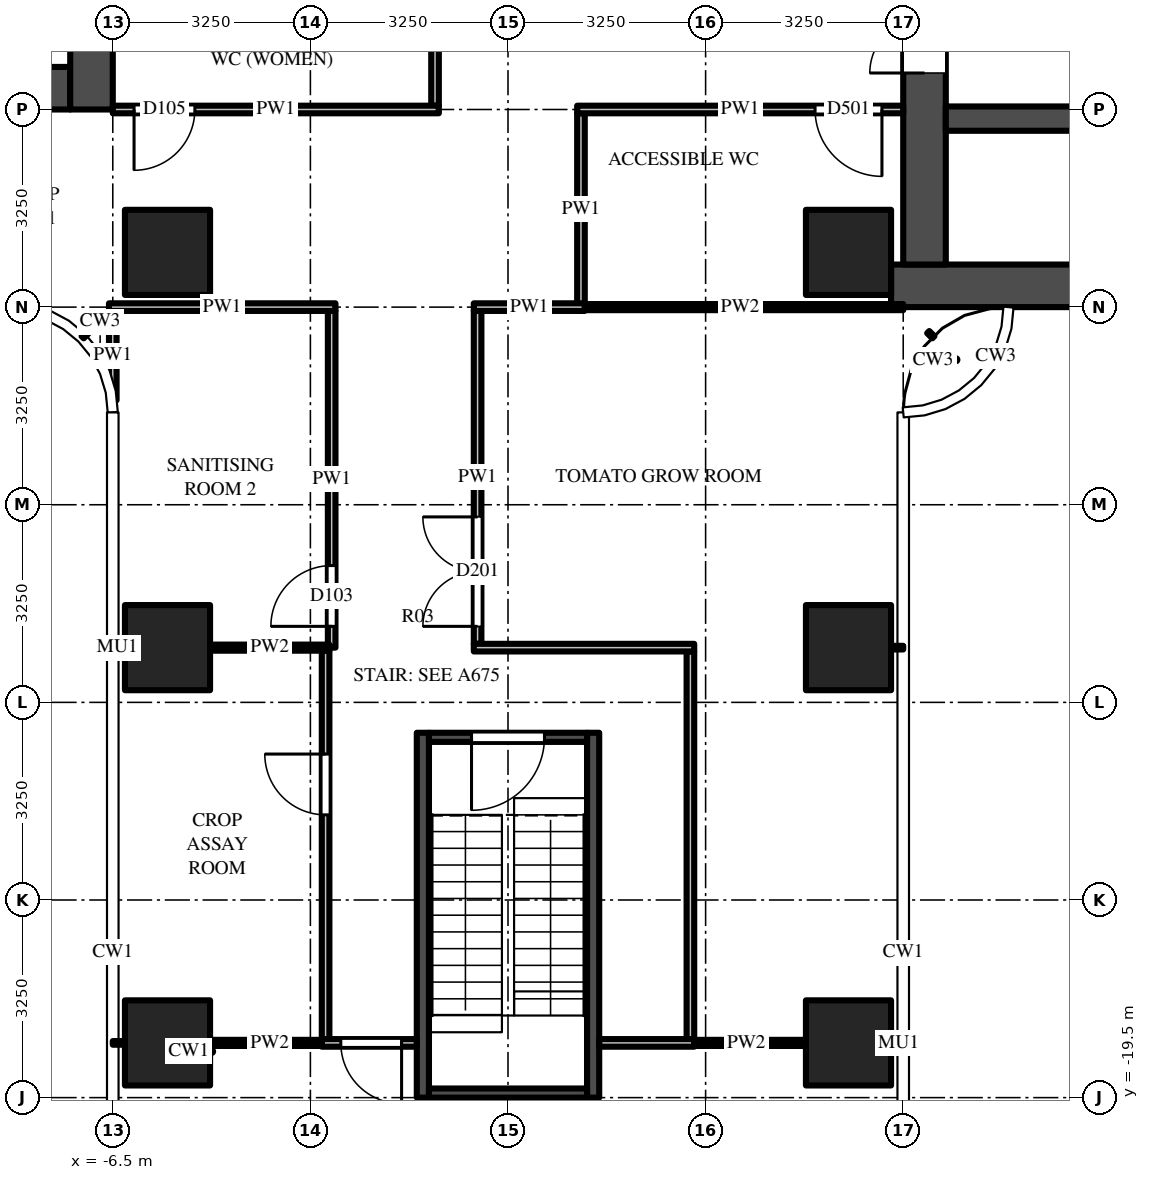
"""IFC4 building model, lengths in metres.
Left out: names, types, materials, properties, quantities, classifications, styles, units other than length and angle.
Written with IfcOpenShell. Run it as: python <this file> out.ifc"""

import sys

from ifc_helpers import new_model, si_unit, direction, frame, frame_2d, origin, origin_2d, place, context, subcontext, project, spatial, rectangle, extrude, source, transform, mapped, element, fill, save


model = new_model("IFC4")
c1 = context("Model", 3, precision=1e-05, world=origin(), true_north=direction((0.0, 1.0)))
c2 = subcontext(c1, "Body", "Model", "MODEL_VIEW")
j1 = project(units=[si_unit("LENGTHUNIT", "METRE"), si_unit("PLANEANGLEUNIT", "RADIAN")], contexts=[c1])
p1 = place(None, origin())
s1 = spatial("IfcSite", under=j1, at=p1, CompositionType="ELEMENT")
p2 = place(p1, origin())
s2 = spatial("IfcBuilding", under=s1, at=p2, CompositionType="ELEMENT")
p3 = place(p2, frame((0.0, 0.0, 88.0)))
s3 = spatial("IfcBuildingStorey", under=s2, at=p3, CompositionType="ELEMENT", Elevation=88.0)
m1 = source(origin(), c2, "Body", "SweptSolid", [
    extrude(rectangle(XDim=1.4, YDim=1.4, at=origin_2d()), origin(), (0.0, 0.0, 1.0), 4.5),
])
for number, where, z_axis, x_axis in (
    (1, (5.6, -5.6, 0.0), (0.0, 0.0, 1.0), (1.0, 0.0, 0.0)),
    (2, (-5.6, -5.6, 0.0), (0.0, 0.0, 1.0), (1.0, 0.0, 0.0)),
    (3, (5.6, -12.1, 0.0), (0.0, 0.0, 1.0), (1.0, 0.0, 0.0)),
    (4, (5.6, -18.6, 0.0), (0.0, 0.0, 1.0), (1.0, 0.0, 0.0)),
    (5, (-5.6, -12.1, 0.0), (0.0, 0.0, 1.0), (1.0, 0.0, 0.0)),
    (6, (-5.6, -18.6, 0.0), (0.0, 0.0, 1.0), (1.0, 0.0, 0.0)),
):
    element("IfcColumn", number, at=place(p3, frame(where, z_axis=z_axis, x_axis=x_axis)), inside=s3, PredefinedType="COLUMN", context=c2, shape_type="MappedRepresentation", body=[
        mapped(m1, transform((0.0, 0.0, 0.0))),
    ])
m2 = source(origin(), c2, "Body", "SweptSolid", [
    extrude(rectangle(XDim=16.45, YDim=0.7, at=frame_2d((8.225, 0.0))), origin(), (0.0, 0.0, 1.0), 4.2),
])
p4 = place(p3, frame((6.3, -6.15, 0.0), z_axis=(0.0, 0.0, 1.0), x_axis=(1.0, 0.0, 0.0)))
e7 = element("IfcWall", 7, at=p4, inside=s3, PredefinedType="SHEAR", context=c2, shape_type="MappedRepresentation", body=[
    mapped(m2, transform((0.0, 0.0, 0.0))),
])
m3 = source(origin(), c2, "Body", "SweptSolid", [
    extrude(rectangle(XDim=9.05, YDim=0.7, at=frame_2d((4.525, 0.0))), origin(), (0.0, 0.0, 1.0), 4.2),
])
p5 = place(p3, frame((6.85, -5.8, 0.0), z_axis=(0.0, 0.0, 1.0), x_axis=(0.0, 1.0, 0.0)))
e8 = element("IfcWall", 8, at=p5, inside=s3, PredefinedType="SHEAR", context=c2, shape_type="MappedRepresentation", body=[
    mapped(m3, transform((0.0, 0.0, 0.0))),
])
m4 = source(origin(), c2, "Body", "SweptSolid", [
    extrude(rectangle(XDim=1.8, YDim=2.1, at=frame_2d((0.9, 1.05))), frame((0.0, 0.36, 0.0), z_axis=(0.0, -1.0, 0.0), x_axis=(1.0, 0.0, 0.0)), (0.0, 0.0, 1.0), 0.72),
])
p6 = place(p5, frame((3.15, 0.0, 0.0)))
e9 = element("IfcOpeningElement", 9, at=p6, cuts=e8, PredefinedType="OPENING", context=c2, shape_type="MappedRepresentation", body=[
    mapped(m4, transform((0.0, 0.0, 0.0))),
])
m5 = source(origin(), c2, "Body", "SweptSolid", [
    extrude(rectangle(XDim=7.5, YDim=0.4, at=frame_2d((3.75, 0.0))), origin(), (0.0, 0.0, 1.0), 4.2),
])
p7 = place(p3, frame((7.2, -3.4, 0.0), z_axis=(0.0, 0.0, 1.0), x_axis=(1.0, 0.0, 0.0)))
e10 = element("IfcWall", 10, at=p7, inside=s3, PredefinedType="SHEAR", context=c2, shape_type="MappedRepresentation", body=[
    mapped(m5, transform((0.0, 0.0, 0.0))),
])
m6 = source(origin(), c2, "Body", "SweptSolid", [
    extrude(rectangle(XDim=1.1, YDim=2.1, at=frame_2d((0.55, 1.05))), frame((0.0, 0.21, 0.0), z_axis=(0.0, -1.0, 0.0), x_axis=(1.0, 0.0, 0.0)), (0.0, 0.0, 1.0), 0.42),
])
p8 = place(p7, frame((3.0, 0.0, 0.0)))
e11 = element("IfcOpeningElement", 11, at=p8, cuts=e10, PredefinedType="OPENING", context=c2, shape_type="MappedRepresentation", body=[
    mapped(m6, transform((0.0, 0.0, 0.0))),
])
p9 = place(p7, frame((5.5, 0.0, 0.0)))
e12 = element("IfcOpeningElement", 12, at=p9, cuts=e10, PredefinedType="OPENING", context=c2, shape_type="MappedRepresentation", body=[
    mapped(m6, transform((0.0, 0.0, 0.0))),
])
m7 = source(origin(), c2, "Body", "SweptSolid", [
    extrude(rectangle(XDim=14.85, YDim=0.7, at=frame_2d((7.425, 0.0))), origin(), (0.0, 0.0, 1.0), 4.2),
])
p10 = place(p3, frame((-7.2, -2.9, 0.0), z_axis=(0.0, 0.0, 1.0), x_axis=(-1.0, 0.0, 0.0)))
e13 = element("IfcWall", 13, at=p10, inside=s3, PredefinedType="SHEAR", context=c2, shape_type="MappedRepresentation", body=[
    mapped(m7, transform((0.0, 0.0, 0.0))),
])
m8 = source(origin(), c2, "Body", "SweptSolid", [
    extrude(rectangle(XDim=1.3, YDim=2.1, at=frame_2d((0.65, 1.05))), frame((0.0, 0.36, 0.0), z_axis=(0.0, -1.0, 0.0), x_axis=(1.0, 0.0, 0.0)), (0.0, 0.0, 1.0), 0.72),
])
p11 = place(p10, frame((12.2, 0.0, 0.0)))
e14 = element("IfcOpeningElement", 14, at=p11, cuts=e13, PredefinedType="OPENING", context=c2, shape_type="MappedRepresentation", body=[
    mapped(m8, transform((0.0, 0.0, 0.0))),
])
m9 = source(origin(), c2, "Body", "SweptSolid", [
    extrude(rectangle(XDim=1.2, YDim=2.1, at=frame_2d((0.6, 1.05))), frame((0.0, 0.36, 0.0), z_axis=(0.0, -1.0, 0.0), x_axis=(1.0, 0.0, 0.0)), (0.0, 0.0, 1.0), 0.72),
])
p12 = place(p10, frame((9.85, 0.0, 0.0)))
e15 = element("IfcOpeningElement", 15, at=p12, cuts=e13, PredefinedType="OPENING", context=c2, shape_type="MappedRepresentation", body=[
    mapped(m9, transform((0.0, 0.0, 0.0))),
])
m10 = source(origin(), c2, "Body", "SweptSolid", [
    extrude(rectangle(XDim=1.0, YDim=2.1, at=frame_2d((0.5, 1.05))), frame((0.0, 0.36, 0.0), z_axis=(0.0, -1.0, 0.0), x_axis=(1.0, 0.0, 0.0)), (0.0, 0.0, 1.0), 0.72),
])
p13 = place(p10, frame((7.9, 0.0, 0.0)))
e16 = element("IfcOpeningElement", 16, at=p13, cuts=e13, PredefinedType="OPENING", context=c2, shape_type="MappedRepresentation", body=[
    mapped(m10, transform((0.0, 0.0, 0.0))),
])
p14 = place(p10, frame((0.6, 0.0, 0.0)))
e17 = element("IfcOpeningElement", 17, at=p14, cuts=e13, PredefinedType="OPENING", context=c2, shape_type="MappedRepresentation", body=[
    mapped(m10, transform((0.0, 0.0, 0.0))),
])
m11 = source(origin(), c2, "Body", "SweptSolid", [
    extrude(rectangle(XDim=0.9, YDim=2.1, at=frame_2d((0.45, 1.05))), frame((0.0, 0.36, 0.0), z_axis=(0.0, -1.0, 0.0), x_axis=(1.0, 0.0, 0.0)), (0.0, 0.0, 1.0), 0.72),
])
p15 = place(p10, frame((3.25, 0.0, 0.0)))
e18 = element("IfcOpeningElement", 18, at=p15, cuts=e13, PredefinedType="OPENING", context=c2, shape_type="MappedRepresentation", body=[
    mapped(m11, transform((0.0, 0.0, 0.0))),
])
p16 = place(p10, frame((5.85, 0.0, 0.0)))
e19 = element("IfcOpeningElement", 19, at=p16, cuts=e13, PredefinedType="OPENING", context=c2, shape_type="MappedRepresentation", body=[
    mapped(m11, transform((0.0, 0.0, 0.0))),
])
p17 = place(p3, frame((-6.85, 5.8, 0.0), z_axis=(0.0, 0.0, 1.0), x_axis=(0.0, -1.0, 0.0)))
e20 = element("IfcWall", 20, at=p17, inside=s3, PredefinedType="SHEAR", context=c2, shape_type="MappedRepresentation", body=[
    mapped(m3, transform((0.0, 0.0, 0.0))),
])
p18 = place(p17, frame((3.15, 0.0, 0.0)))
e21 = element("IfcOpeningElement", 21, at=p18, cuts=e20, PredefinedType="OPENING", context=c2, shape_type="MappedRepresentation", body=[
    mapped(m4, transform((0.0, 0.0, 0.0))),
])
m12 = source(origin(), c2, "Body", "SweptSolid", [
    extrude(rectangle(XDim=6.0, YDim=0.2, at=frame_2d((3.0, 0.0))), origin(), (0.0, 0.0, 1.0), 4.2),
])
for number, where, z_axis, x_axis in (
    (22, (1.4, -13.5, 0.0), (0.0, 0.0, 1.0), (0.0, -1.0, 0.0)),
    (23, (-1.4, -13.5, 0.0), (0.0, 0.0, 1.0), (0.0, -1.0, 0.0)),
):
    element("IfcWall", number, at=place(p3, frame(where, z_axis=z_axis, x_axis=x_axis)), inside=s3, PredefinedType="SHEAR", context=c2, shape_type="MappedRepresentation", body=[
        mapped(m12, transform((0.0, 0.0, 0.0))),
    ])
m13 = source(origin(), c2, "Body", "SweptSolid", [
    extrude(rectangle(XDim=2.6, YDim=0.15, at=frame_2d((1.3, 0.0))), origin(), (0.0, 0.0, 1.0), 4.2),
])
p19 = place(p3, frame((1.3, -13.575, 0.0), z_axis=(0.0, 0.0, 1.0), x_axis=(-1.0, 0.0, 0.0)))
e24 = element("IfcWall", 24, at=p19, inside=s3, PredefinedType="SHEAR", context=c2, shape_type="MappedRepresentation", body=[
    mapped(m13, transform((0.0, 0.0, 0.0))),
])
m14 = source(origin(), c2, "Body", "SweptSolid", [
    extrude(rectangle(XDim=1.2, YDim=2.1, at=frame_2d((0.6, 1.05))), frame((0.0, 0.085, 0.0), z_axis=(0.0, -1.0, 0.0), x_axis=(1.0, 0.0, 0.0)), (0.0, 0.0, 1.0), 0.17),
])
p20 = place(p19, frame((0.7, 0.0, 0.0)))
e25 = element("IfcOpeningElement", 25, at=p20, cuts=e24, PredefinedType="OPENING", context=c2, shape_type="MappedRepresentation", body=[
    mapped(m14, transform((0.0, 0.0, 0.0))),
])
p21 = place(p3, frame((1.3, -19.425, 0.0), z_axis=(0.0, 0.0, 1.0), x_axis=(-1.0, 0.0, 0.0)))
e26 = element("IfcWall", 26, at=p21, inside=s3, PredefinedType="SHEAR", context=c2, shape_type="MappedRepresentation", body=[
    mapped(m13, transform((0.0, 0.0, 0.0))),
])
m15 = source(origin(), c2, "Body", "SweptSolid", [
    extrude(rectangle(XDim=1.469, YDim=0.125, at=frame_2d((0.734, 0.0))), origin(), (0.0, 0.0, 1.0), 4.2),
])
p22 = place(p3, frame((-6.5, -6.562, 0.0), z_axis=(0.0, 0.0, 1.0), x_axis=(0.0, -1.0, 0.0)))
e27 = element("IfcWall", 27, at=p22, inside=s3, PredefinedType="PARTITIONING", context=c2, shape_type="MappedRepresentation", body=[
    mapped(m15, transform((0.0, 0.0, 0.0))),
])
p23 = place(p3, frame((-3.0, -18.55, 0.0), z_axis=(0.0, 0.0, 1.0), x_axis=(0.0, 1.0, 0.0)))
e28 = element("IfcWall", 28, at=p23, inside=s3, PredefinedType="PARTITIONING", context=c2, shape_type="SweptSolid", body=[
    extrude(rectangle(XDim=6.4, YDim=0.125, at=frame_2d((3.2, 0.0))), origin(), (0.0, 0.0, 1.0), 3.418),
])
m16 = source(origin(), c2, "Body", "SweptSolid", [
    extrude(rectangle(XDim=1.0, YDim=2.1, at=frame_2d((0.5, 1.05))), frame((0.0, 0.073, 0.0), z_axis=(0.0, -1.0, 0.0), x_axis=(1.0, 0.0, 0.0)), (0.0, 0.0, 1.0), 0.145),
])
p24 = place(p23, frame((3.7, 0.0, 0.0)))
e29 = element("IfcOpeningElement", 29, at=p24, cuts=e28, PredefinedType="OPENING", context=c2, shape_type="MappedRepresentation", body=[
    mapped(m16, transform((0.0, 0.0, 0.0))),
])
m17 = source(origin(), c2, "Body", "SweptSolid", [
    extrude(rectangle(XDim=5.538, YDim=0.125, at=frame_2d((2.769, 0.0))), origin(), (0.0, 0.0, 1.0), 3.418),
])
p25 = place(p3, frame((-2.9, -12.1, 0.0), z_axis=(0.0, 0.0, 1.0), x_axis=(0.0, 1.0, 0.0)))
e30 = element("IfcWall", 30, at=p25, inside=s3, PredefinedType="PARTITIONING", context=c2, shape_type="MappedRepresentation", body=[
    mapped(m17, transform((0.0, 0.0, 0.0))),
])
p26 = place(p25, frame((0.35, 0.0, 0.0)))
e31 = element("IfcOpeningElement", 31, at=p26, cuts=e30, PredefinedType="OPENING", context=c2, shape_type="MappedRepresentation", body=[
    mapped(m16, transform((0.0, 0.0, 0.0))),
])
m18 = source(origin(), c2, "Body", "SweptSolid", [
    extrude(rectangle(XDim=3.125, YDim=0.125, at=frame_2d((1.562, 0.0))), origin(), (0.0, 0.0, 1.0), 3.496),
])
p27 = place(p3, frame((-1.2, -0.062, 0.0), z_axis=(0.0, 0.0, 1.0), x_axis=(0.0, -1.0, 0.0)))
e32 = element("IfcWall", 32, at=p27, inside=s3, PredefinedType="PARTITIONING", context=c2, shape_type="MappedRepresentation", body=[
    mapped(m18, transform((0.0, 0.0, 0.0))),
])
m19 = source(origin(), c2, "Body", "SweptSolid", [
    extrude(rectangle(XDim=5.475, YDim=0.125, at=frame_2d((2.738, 0.0))), origin(), (0.0, 0.0, 1.0), 3.418),
])
p28 = place(p3, frame((-0.5, -12.038, 0.0), z_axis=(0.0, 0.0, 1.0), x_axis=(0.0, 1.0, 0.0)))
e33 = element("IfcWall", 33, at=p28, inside=s3, PredefinedType="PARTITIONING", context=c2, shape_type="MappedRepresentation", body=[
    mapped(m19, transform((0.0, 0.0, 0.0))),
])
m20 = source(origin(), c2, "Body", "SweptSolid", [
    extrude(rectangle(XDim=1.8, YDim=2.1, at=frame_2d((0.9, 1.05))), frame((0.0, 0.073, 0.0), z_axis=(0.0, -1.0, 0.0), x_axis=(1.0, 0.0, 0.0)), (0.0, 0.0, 1.0), 0.145),
])
p29 = place(p28, frame((0.288, 0.0, 0.0)))
e34 = element("IfcOpeningElement", 34, at=p29, cuts=e33, PredefinedType="OPENING", context=c2, shape_type="MappedRepresentation", body=[
    mapped(m20, transform((0.0, 0.0, 0.0))),
])
m21 = source(origin(), c2, "Body", "SweptSolid", [
    extrude(rectangle(XDim=3.137, YDim=0.125, at=frame_2d((1.569, 0.0))), origin(), (0.0, 0.0, 1.0), 3.418),
])
p30 = place(p3, frame((1.2, -3.312, 0.0), z_axis=(0.0, 0.0, 1.0), x_axis=(0.0, -1.0, 0.0)))
e35 = element("IfcWall", 35, at=p30, inside=s3, PredefinedType="PARTITIONING", context=c2, shape_type="MappedRepresentation", body=[
    mapped(m21, transform((0.0, 0.0, 0.0))),
])
p31 = place(p3, frame((3.0, -12.163, 0.0), z_axis=(0.0, 0.0, 1.0), x_axis=(0.0, -1.0, 0.0)))
e36 = element("IfcWall", 36, at=p31, inside=s3, PredefinedType="PARTITIONING", context=c2, shape_type="SweptSolid", body=[
    extrude(rectangle(XDim=6.387, YDim=0.125, at=frame_2d((3.194, 0.0))), origin(), (0.0, 0.0, 1.0), 3.418),
])
m22 = source(origin(), c2, "Body", "SweptSolid", [
    extrude(rectangle(XDim=1.962, YDim=0.1, at=frame_2d((0.981, 0.0))), origin(), (0.0, 0.0, 1.0), 3.647),
])
for number, where, z_axis, x_axis in (
    (37, (-4.9, -18.6, 0.0), (0.0, 0.0, 1.0), (1.0, 0.0, 0.0)),
    (38, (2.938, -18.6, 0.0), (0.0, 0.0, 1.0), (1.0, 0.0, 0.0)),
):
    element("IfcWall", number, at=place(p3, frame(where, z_axis=z_axis, x_axis=x_axis)), inside=s3, PredefinedType="PARTITIONING", context=c2, shape_type="MappedRepresentation", body=[
        mapped(m22, transform((0.0, 0.0, 0.0))),
    ])
m23 = source(origin(), c2, "Body", "SweptSolid", [
    extrude(rectangle(XDim=1.562, YDim=0.125, at=frame_2d((0.781, 0.0))), origin(), (0.0, 0.0, 1.0), 3.647),
])
p32 = place(p3, frame((-1.5, -18.6, 0.0), z_axis=(0.0, 0.0, 1.0), x_axis=(-1.0, 0.0, 0.0)))
e39 = element("IfcWall", 39, at=p32, inside=s3, PredefinedType="PARTITIONING", context=c2, shape_type="MappedRepresentation", body=[
    mapped(m23, transform((0.0, 0.0, 0.0))),
])
p33 = place(p32, frame((0.25, 0.0, 0.0)))
e40 = element("IfcOpeningElement", 40, at=p33, cuts=e39, PredefinedType="OPENING", context=c2, shape_type="MappedRepresentation", body=[
    mapped(m16, transform((0.0, 0.0, 0.0))),
])
p34 = place(p3, frame((3.062, -18.6, 0.0), z_axis=(0.0, 0.0, 1.0), x_axis=(-1.0, 0.0, 0.0)))
e41 = element("IfcWall", 41, at=p34, inside=s3, PredefinedType="PARTITIONING", context=c2, shape_type="MappedRepresentation", body=[
    mapped(m23, transform((0.0, 0.0, 0.0))),
])
m24 = source(origin(), c2, "Body", "SweptSolid", [
    extrude(rectangle(XDim=1.962, YDim=0.1, at=frame_2d((0.981, 0.0))), origin(), (0.0, 0.0, 1.0), 3.418),
])
p35 = place(p3, frame((-4.9, -12.1, 0.0), z_axis=(0.0, 0.0, 1.0), x_axis=(1.0, 0.0, 0.0)))
e42 = element("IfcWall", 42, at=p35, inside=s3, PredefinedType="PARTITIONING", context=c2, shape_type="MappedRepresentation", body=[
    mapped(m24, transform((0.0, 0.0, 0.0))),
])
m25 = source(origin(), c2, "Body", "SweptSolid", [
    extrude(rectangle(XDim=3.625, YDim=0.125, at=frame_2d((1.812, 0.0))), origin(), (0.0, 0.0, 1.0), 3.418),
])
p36 = place(p3, frame((-0.562, -12.1, 0.0), z_axis=(0.0, 0.0, 1.0), x_axis=(1.0, 0.0, 0.0)))
e43 = element("IfcWall", 43, at=p36, inside=s3, PredefinedType="PARTITIONING", context=c2, shape_type="MappedRepresentation", body=[
    mapped(m25, transform((0.0, 0.0, 0.0))),
])
m26 = source(origin(), c2, "Body", "SweptSolid", [
    extrude(rectangle(XDim=5.363, YDim=0.1, at=frame_2d((2.681, 0.0))), origin(), (0.0, 0.0, 1.0), 3.28),
])
p37 = place(p3, frame((1.137, -6.5, 0.0), z_axis=(0.0, 0.0, 1.0), x_axis=(1.0, 0.0, 0.0)))
e44 = element("IfcWall", 44, at=p37, inside=s3, PredefinedType="PARTITIONING", context=c2, shape_type="MappedRepresentation", body=[
    mapped(m26, transform((0.0, 0.0, 0.0))),
])
m27 = source(origin(), c2, "Body", "SweptSolid", [
    extrude(rectangle(XDim=3.725, YDim=0.125, at=frame_2d((1.863, 0.0))), origin(), (0.0, 0.0, 1.0), 3.28),
])
p38 = place(p3, frame((-2.837, -6.5, 0.0), z_axis=(0.0, 0.0, 1.0), x_axis=(-1.0, 0.0, 0.0)))
e45 = element("IfcWall", 45, at=p38, inside=s3, PredefinedType="PARTITIONING", context=c2, shape_type="MappedRepresentation", body=[
    mapped(m27, transform((0.0, 0.0, 0.0))),
])
m28 = source(origin(), c2, "Body", "SweptSolid", [
    extrude(rectangle(XDim=1.825, YDim=0.125, at=frame_2d((0.913, 0.0))), origin(), (0.0, 0.0, 1.0), 4.2),
])
p39 = place(p3, frame((1.262, -6.5, 0.0), z_axis=(0.0, 0.0, 1.0), x_axis=(-1.0, 0.0, 0.0)))
e46 = element("IfcWall", 46, at=p39, inside=s3, PredefinedType="PARTITIONING", context=c2, shape_type="MappedRepresentation", body=[
    mapped(m28, transform((0.0, 0.0, 0.0))),
])
m29 = source(origin(), c2, "Body", "SweptSolid", [
    extrude(rectangle(XDim=5.363, YDim=0.125, at=frame_2d((2.681, 0.0))), origin(), (0.0, 0.0, 1.0), 3.418),
])
p40 = place(p3, frame((-1.137, -3.25, 0.0), z_axis=(0.0, 0.0, 1.0), x_axis=(-1.0, 0.0, 0.0)))
e47 = element("IfcWall", 47, at=p40, inside=s3, PredefinedType="PARTITIONING", context=c2, shape_type="MappedRepresentation", body=[
    mapped(m29, transform((0.0, 0.0, 0.0))),
])
p41 = place(p40, frame((4.012, 0.0, 0.0)))
e48 = element("IfcOpeningElement", 48, at=p41, cuts=e47, PredefinedType="OPENING", context=c2, shape_type="MappedRepresentation", body=[
    mapped(m16, transform((0.0, 0.0, 0.0))),
])
p42 = place(p3, frame((6.5, -3.25, 0.0), z_axis=(0.0, 0.0, 1.0), x_axis=(-1.0, 0.0, 0.0)))
e49 = element("IfcWall", 49, at=p42, inside=s3, PredefinedType="PARTITIONING", context=c2, shape_type="MappedRepresentation", body=[
    mapped(m29, transform((0.0, 0.0, 0.0))),
])
m30 = source(origin(), c2, "Body", "SweptSolid", [
    extrude(rectangle(XDim=1.1, YDim=2.1, at=frame_2d((0.55, 1.05))), frame((0.0, 0.073, 0.0), z_axis=(0.0, -1.0, 0.0), x_axis=(1.0, 0.0, 0.0)), (0.0, 0.0, 1.0), 0.145),
])
p43 = place(p42, frame((0.35, 0.0, 0.0)))
e50 = element("IfcOpeningElement", 50, at=p43, cuts=e49, PredefinedType="OPENING", context=c2, shape_type="MappedRepresentation", body=[
    mapped(m30, transform((0.0, 0.0, 0.0))),
])
m31 = source(origin(), c2, "Body", "SweptSolid", [
    extrude(rectangle(XDim=1.8, YDim=2.1, at=frame_2d((0.9, 1.05))), frame((0.0, -0.275, 0.0), z_axis=(0.0, -1.0, 0.0), x_axis=(1.0, 0.0, 0.0)), (0.0, 0.0, 1.0), 0.05),
])
p44 = place(p6, origin())
e51 = element("IfcDoor", 51, at=p44, inside=s3, OperationType="DOUBLE_DOOR_SINGLE_SWING", PredefinedType="DOOR", context=c2, shape_type="MappedRepresentation", body=[
    mapped(m31, transform((0.0, 0.0, 0.0))),
])
fill(e9, e51)
m32 = source(origin(), c2, "Body", "SweptSolid", [
    extrude(rectangle(XDim=1.2, YDim=2.1, at=frame_2d((0.6, 1.05))), frame((0.0, 0.025, 0.0), z_axis=(0.0, -1.0, 0.0), x_axis=(1.0, 0.0, 0.0)), (0.0, 0.0, 1.0), 0.05),
])
p45 = place(p20, origin())
e52 = element("IfcDoor", 52, at=p45, inside=s3, OperationType="SINGLE_SWING_RIGHT", PredefinedType="DOOR", context=c2, shape_type="MappedRepresentation", body=[
    mapped(m32, transform((0.0, 0.0, 0.0))),
])
fill(e25, e52)
m33 = source(origin(), c2, "Body", "SweptSolid", [
    extrude(rectangle(XDim=1.0, YDim=2.1, at=frame_2d((0.5, 1.05))), frame((0.0, 0.025, 0.0), z_axis=(0.0, -1.0, 0.0), x_axis=(1.0, 0.0, 0.0)), (0.0, 0.0, 1.0), 0.05),
])
p46 = place(p33, origin())
e53 = element("IfcDoor", 53, at=p46, inside=s3, OperationType="SINGLE_SWING_LEFT", PredefinedType="DOOR", context=c2, shape_type="MappedRepresentation", body=[
    mapped(m33, transform((0.0, 0.0, 0.0))),
])
fill(e40, e53)
p47 = place(p24, origin())
e54 = element("IfcDoor", 54, at=p47, inside=s3, OperationType="SINGLE_SWING_RIGHT", PredefinedType="DOOR", context=c2, shape_type="MappedRepresentation", body=[
    mapped(m33, transform((0.0, 0.0, 0.0))),
])
fill(e29, e54)
p48 = place(p26, origin())
e55 = element("IfcDoor", 55, at=p48, inside=s3, OperationType="SINGLE_SWING_LEFT", PredefinedType="DOOR", context=c2, shape_type="MappedRepresentation", body=[
    mapped(m33, transform((0.0, 0.0, 0.0))),
])
fill(e31, e55)
m34 = source(origin(), c2, "Body", "SweptSolid", [
    extrude(rectangle(XDim=1.8, YDim=2.1, at=frame_2d((0.9, 1.05))), frame((0.0, 0.025, 0.0), z_axis=(0.0, -1.0, 0.0), x_axis=(1.0, 0.0, 0.0)), (0.0, 0.0, 1.0), 0.05),
])
p49 = place(p29, origin())
e56 = element("IfcDoor", 56, at=p49, inside=s3, OperationType="DOUBLE_DOOR_SINGLE_SWING", PredefinedType="DOOR", context=c2, shape_type="MappedRepresentation", body=[
    mapped(m34, transform((0.0, 0.0, 0.0))),
])
fill(e34, e56)
p50 = place(p41, origin())
e57 = element("IfcDoor", 57, at=p50, inside=s3, OperationType="SINGLE_SWING_RIGHT", PredefinedType="DOOR", context=c2, shape_type="MappedRepresentation", body=[
    mapped(m33, transform((0.0, 0.0, 0.0))),
])
fill(e48, e57)
m35 = source(origin(), c2, "Body", "SweptSolid", [
    extrude(rectangle(XDim=1.1, YDim=2.1, at=frame_2d((0.55, 1.05))), frame((0.0, 0.025, 0.0), z_axis=(0.0, -1.0, 0.0), x_axis=(1.0, 0.0, 0.0)), (0.0, 0.0, 1.0), 0.05),
])
p51 = place(p43, origin())
e58 = element("IfcDoor", 58, at=p51, inside=s3, OperationType="SINGLE_SWING_LEFT", PredefinedType="DOOR", context=c2, shape_type="MappedRepresentation", body=[
    mapped(m35, transform((0.0, 0.0, 0.0))),
])
fill(e50, e58)
save(model, sys.argv[1])
